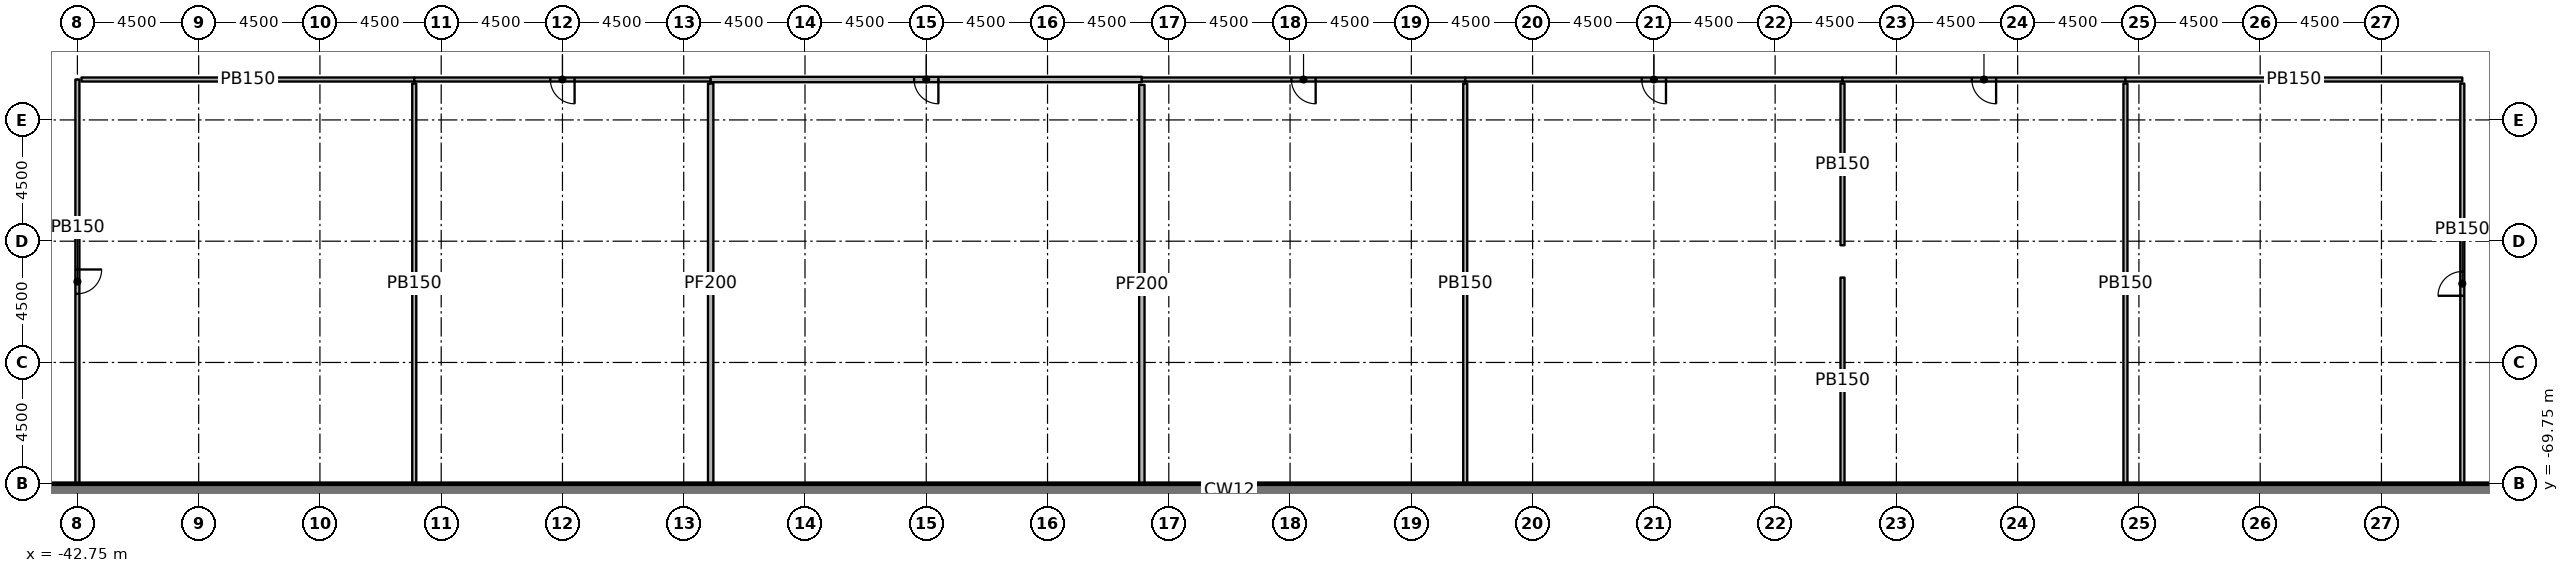
"""IFC4 building model, lengths in metres.
Left out: names, types, materials, properties, quantities, classifications, styles, units other than length and angle.
Written with IfcOpenShell. Run it as: python <this file> out.ifc"""

import sys

from ifc_helpers import new_model, si_unit, direction, frame, frame_2d, origin, origin_2d, place, context, subcontext, project, spatial, rectangle, extrude, element, fill, save


model = new_model("IFC4")
c1 = context("Model", 3, precision=1e-05, world=origin(), true_north=direction((0.0, 1.0)))
c2 = subcontext(c1, "Body", "Model", "MODEL_VIEW")
j1 = project(units=[si_unit("LENGTHUNIT", "METRE"), si_unit("PLANEANGLEUNIT", "RADIAN")], contexts=[c1])
p1 = place(None, origin())
s1 = spatial("IfcSite", under=j1, at=p1, CompositionType="ELEMENT")
p2 = place(p1, origin())
s2 = spatial("IfcBuilding", under=s1, at=p2, CompositionType="ELEMENT")
p3 = place(p2, frame((0.0, 0.0, -8.0)))
s3 = spatial("IfcBuildingStorey", under=s2, at=p3, CompositionType="ELEMENT", Elevation=-8.0)
for number, where, z_axis, x_axis in (
    (1, (-40.5, -61.5, 0.0), (0.0, 0.0, 1.0), (1.0, 0.0, 0.0)),
    (2, (-31.5, -61.5, 0.0), (0.0, 0.0, 1.0), (1.0, 0.0, 0.0)),
    (3, (-22.5, -61.5, 0.0), (0.0, 0.0, 1.0), (1.0, 0.0, 0.0)),
    (4, (-13.5, -61.5, 0.0), (0.0, 0.0, 1.0), (1.0, 0.0, 0.0)),
    (5, (-4.5, -61.5, 0.0), (0.0, 0.0, 1.0), (1.0, 0.0, 0.0)),
    (6, (4.5, -61.5, 0.0), (0.0, 0.0, 1.0), (1.0, 0.0, 0.0)),
    (7, (13.5, -61.5, 0.0), (0.0, 0.0, 1.0), (1.0, 0.0, 0.0)),
    (8, (22.5, -61.5, 0.0), (0.0, 0.0, 1.0), (1.0, 0.0, 0.0)),
    (9, (31.5, -61.5, 0.0), (0.0, 0.0, 1.0), (1.0, 0.0, 0.0)),
    (10, (40.5, -61.5, 0.0), (0.0, 0.0, 1.0), (1.0, 0.0, 0.0)),
):
    element("IfcColumn", number, at=place(p3, frame(where, z_axis=z_axis, x_axis=x_axis)), inside=s3, PredefinedType="COLUMN", context=c2, shape_type="SweptSolid", body=[
        extrude(rectangle(XDim=1.2, YDim=1.2, at=origin_2d()), origin(), (0.0, 0.0, 1.0), 3.4),
    ])
p4 = place(p3, frame((-61.25, -70.0, 0.0), z_axis=(0.0, 0.0, 1.0), x_axis=(1.0, 0.0, 0.0)))
e11 = element("IfcWall", 11, at=p4, inside=s3, PredefinedType="SOLIDWALL", context=c2, shape_type="SweptSolid", body=[
    extrude(rectangle(XDim=122.5, YDim=0.5, at=frame_2d((61.25, 0.0))), origin(), (0.0, 0.0, 1.0), 4.0),
])
p5 = place(p3, frame((-42.75, -54.75, 0.0), z_axis=(0.0, 0.0, 1.0), x_axis=(0.0, -1.0, 0.0)))
e12 = element("IfcWall", 12, at=p5, inside=s3, PredefinedType="PARTITIONING", context=c2, shape_type="SweptSolid", body=[
    extrude(rectangle(XDim=15.0, YDim=0.15, at=frame_2d((7.5, 0.0))), origin(), (0.0, 0.0, 1.0), 3.4),
])
p6 = place(p5, frame((7.05, 0.0, 0.0)))
e13 = element("IfcOpeningElement", 13, at=p6, cuts=e12, PredefinedType="OPENING", context=c2, shape_type="SweptSolid", body=[
    extrude(rectangle(XDim=0.9, YDim=2.1, at=frame_2d((0.45, 1.05))), frame((0.0, 0.085, 0.0), z_axis=(0.0, -1.0, 0.0), x_axis=(1.0, 0.0, 0.0)), (0.0, 0.0, 1.0), 0.17),
])
p7 = place(p3, frame((-30.25, -54.75, 0.0), z_axis=(0.0, 0.0, 1.0), x_axis=(-1.0, 0.0, 0.0)))
e14 = element("IfcWall", 14, at=p7, inside=s3, PredefinedType="PARTITIONING", context=c2, shape_type="SweptSolid", body=[
    extrude(rectangle(XDim=12.35, YDim=0.15, at=frame_2d((6.175, 0.0))), origin(), (0.0, 0.0, 1.0), 3.4),
])
p8 = place(p3, frame((-19.25, -54.75, 0.0), z_axis=(0.0, 0.0, 1.0), x_axis=(-1.0, 0.0, 0.0)))
e15 = element("IfcWall", 15, at=p8, inside=s3, PredefinedType="PARTITIONING", context=c2, shape_type="SweptSolid", body=[
    extrude(rectangle(XDim=11.0, YDim=0.15, at=frame_2d((5.5, 0.0))), origin(), (0.0, 0.0, 1.0), 3.4),
])
p9 = place(p8, frame((5.05, 0.0, 0.0)))
e16 = element("IfcOpeningElement", 16, at=p9, cuts=e15, PredefinedType="OPENING", context=c2, shape_type="SweptSolid", body=[
    extrude(rectangle(XDim=0.9, YDim=2.1, at=frame_2d((0.45, 1.05))), frame((0.0, 0.085, 0.0), z_axis=(0.0, -1.0, 0.0), x_axis=(1.0, 0.0, 0.0)), (0.0, 0.0, 1.0), 0.17),
])
p10 = place(p3, frame((-3.25, -54.75, 0.0), z_axis=(0.0, 0.0, 1.0), x_axis=(-1.0, 0.0, 0.0)))
e17 = element("IfcWall", 17, at=p10, inside=s3, PredefinedType="PARTITIONING", context=c2, shape_type="SweptSolid", body=[
    extrude(rectangle(XDim=16.0, YDim=0.2, at=frame_2d((8.0, 0.0))), origin(), (0.0, 0.0, 1.0), 3.4),
])
p11 = place(p10, frame((7.55, 0.0, 0.0)))
e18 = element("IfcOpeningElement", 18, at=p11, cuts=e17, PredefinedType="OPENING", context=c2, shape_type="SweptSolid", body=[
    extrude(rectangle(XDim=0.9, YDim=2.1, at=frame_2d((0.45, 1.05))), frame((0.0, 0.11, 0.0), z_axis=(0.0, -1.0, 0.0), x_axis=(1.0, 0.0, 0.0)), (0.0, 0.0, 1.0), 0.22),
])
p12 = place(p3, frame((8.75, -54.75, 0.0), z_axis=(0.0, 0.0, 1.0), x_axis=(-1.0, 0.0, 0.0)))
e19 = element("IfcWall", 19, at=p12, inside=s3, PredefinedType="PARTITIONING", context=c2, shape_type="SweptSolid", body=[
    extrude(rectangle(XDim=12.0, YDim=0.15, at=frame_2d((6.0, 0.0))), origin(), (0.0, 0.0, 1.0), 3.4),
])
p13 = place(p12, frame((5.55, 0.0, 0.0)))
e20 = element("IfcOpeningElement", 20, at=p13, cuts=e19, PredefinedType="OPENING", context=c2, shape_type="SweptSolid", body=[
    extrude(rectangle(XDim=0.9, YDim=2.1, at=frame_2d((0.45, 1.05))), frame((0.0, 0.085, 0.0), z_axis=(0.0, -1.0, 0.0), x_axis=(1.0, 0.0, 0.0)), (0.0, 0.0, 1.0), 0.17),
])
p14 = place(p3, frame((22.75, -54.75, 0.0), z_axis=(0.0, 0.0, 1.0), x_axis=(-1.0, 0.0, 0.0)))
e21 = element("IfcWall", 21, at=p14, inside=s3, PredefinedType="PARTITIONING", context=c2, shape_type="SweptSolid", body=[
    extrude(rectangle(XDim=14.0, YDim=0.15, at=frame_2d((7.0, 0.0))), origin(), (0.0, 0.0, 1.0), 3.4),
])
p15 = place(p14, frame((6.55, 0.0, 0.0)))
e22 = element("IfcOpeningElement", 22, at=p15, cuts=e21, PredefinedType="OPENING", context=c2, shape_type="SweptSolid", body=[
    extrude(rectangle(XDim=0.9, YDim=2.1, at=frame_2d((0.45, 1.05))), frame((0.0, 0.085, 0.0), z_axis=(0.0, -1.0, 0.0), x_axis=(1.0, 0.0, 0.0)), (0.0, 0.0, 1.0), 0.17),
])
p16 = place(p3, frame((33.25, -54.75, 0.0), z_axis=(0.0, 0.0, 1.0), x_axis=(-1.0, 0.0, 0.0)))
e23 = element("IfcWall", 23, at=p16, inside=s3, PredefinedType="PARTITIONING", context=c2, shape_type="SweptSolid", body=[
    extrude(rectangle(XDim=10.5, YDim=0.15, at=frame_2d((5.25, 0.0))), origin(), (0.0, 0.0, 1.0), 3.4),
])
p17 = place(p16, frame((4.8, 0.0, 0.0)))
e24 = element("IfcOpeningElement", 24, at=p17, cuts=e23, PredefinedType="OPENING", context=c2, shape_type="SweptSolid", body=[
    extrude(rectangle(XDim=0.9, YDim=2.1, at=frame_2d((0.45, 1.05))), frame((0.0, 0.085, 0.0), z_axis=(0.0, -1.0, 0.0), x_axis=(1.0, 0.0, 0.0)), (0.0, 0.0, 1.0), 0.17),
])
p18 = place(p3, frame((45.75, -54.75, 0.0), z_axis=(0.0, 0.0, 1.0), x_axis=(-1.0, 0.0, 0.0)))
e25 = element("IfcWall", 25, at=p18, inside=s3, PredefinedType="PARTITIONING", context=c2, shape_type="SweptSolid", body=[
    extrude(rectangle(XDim=12.5, YDim=0.15, at=frame_2d((6.25, 0.0))), origin(), (0.0, 0.0, 1.0), 3.4),
])
p19 = place(p3, frame((-30.25, -54.9, 0.0), z_axis=(0.0, 0.0, 1.0), x_axis=(0.0, -1.0, 0.0)))
e26 = element("IfcWall", 26, at=p19, inside=s3, PredefinedType="PARTITIONING", context=c2, shape_type="SweptSolid", body=[
    extrude(rectangle(XDim=14.85, YDim=0.15, at=frame_2d((7.425, 0.0))), origin(), (0.0, 0.0, 1.0), 3.4),
])
p20 = place(p3, frame((-19.25, -54.9, 0.0), z_axis=(0.0, 0.0, 1.0), x_axis=(0.0, -1.0, 0.0)))
e27 = element("IfcWall", 27, at=p20, inside=s3, PredefinedType="PARTITIONING", context=c2, shape_type="SweptSolid", body=[
    extrude(rectangle(XDim=14.85, YDim=0.2, at=frame_2d((7.425, 0.0))), origin(), (0.0, 0.0, 1.0), 3.4),
])
p21 = place(p3, frame((-3.25, -54.95, 0.0), z_axis=(0.0, 0.0, 1.0), x_axis=(0.0, -1.0, 0.0)))
e28 = element("IfcWall", 28, at=p21, inside=s3, PredefinedType="PARTITIONING", context=c2, shape_type="SweptSolid", body=[
    extrude(rectangle(XDim=14.8, YDim=0.2, at=frame_2d((7.4, 0.0))), origin(), (0.0, 0.0, 1.0), 3.4),
])
p22 = place(p3, frame((8.75, -54.9, 0.0), z_axis=(0.0, 0.0, 1.0), x_axis=(0.0, -1.0, 0.0)))
e29 = element("IfcWall", 29, at=p22, inside=s3, PredefinedType="PARTITIONING", context=c2, shape_type="SweptSolid", body=[
    extrude(rectangle(XDim=14.85, YDim=0.15, at=frame_2d((7.425, 0.0))), origin(), (0.0, 0.0, 1.0), 3.4),
])
p23 = place(p3, frame((22.75, -54.9, 0.0), z_axis=(0.0, 0.0, 1.0), x_axis=(0.0, -1.0, 0.0)))
e30 = element("IfcWall", 30, at=p23, inside=s3, PredefinedType="PARTITIONING", context=c2, shape_type="SweptSolid", body=[
    extrude(rectangle(XDim=6.0, YDim=0.15, at=frame_2d((3.0, 0.0))), origin(), (0.0, 0.0, 1.0), 3.4),
])
p24 = place(p3, frame((22.75, -62.1, 0.0), z_axis=(0.0, 0.0, 1.0), x_axis=(0.0, -1.0, 0.0)))
e31 = element("IfcWall", 31, at=p24, inside=s3, PredefinedType="PARTITIONING", context=c2, shape_type="SweptSolid", body=[
    extrude(rectangle(XDim=7.65, YDim=0.15, at=frame_2d((3.825, 0.0))), origin(), (0.0, 0.0, 1.0), 3.4),
])
p25 = place(p3, frame((33.25, -54.9, 0.0), z_axis=(0.0, 0.0, 1.0), x_axis=(0.0, -1.0, 0.0)))
e32 = element("IfcWall", 32, at=p25, inside=s3, PredefinedType="PARTITIONING", context=c2, shape_type="SweptSolid", body=[
    extrude(rectangle(XDim=14.85, YDim=0.15, at=frame_2d((7.425, 0.0))), origin(), (0.0, 0.0, 1.0), 3.4),
])
p26 = place(p3, frame((45.75, -69.75, 0.0), z_axis=(0.0, 0.0, 1.0), x_axis=(0.0, 1.0, 0.0)))
e33 = element("IfcWall", 33, at=p26, inside=s3, PredefinedType="PARTITIONING", context=c2, shape_type="SweptSolid", body=[
    extrude(rectangle(XDim=14.85, YDim=0.15, at=frame_2d((7.425, 0.0))), origin(), (0.0, 0.0, 1.0), 3.4),
])
p27 = place(p26, frame((6.975, 0.0, 0.0)))
e34 = element("IfcOpeningElement", 34, at=p27, cuts=e33, PredefinedType="OPENING", context=c2, shape_type="SweptSolid", body=[
    extrude(rectangle(XDim=0.9, YDim=2.1, at=frame_2d((0.45, 1.05))), frame((0.0, 0.085, 0.0), z_axis=(0.0, -1.0, 0.0), x_axis=(1.0, 0.0, 0.0)), (0.0, 0.0, 1.0), 0.17),
])
p28 = place(p6, origin())
e35 = element("IfcDoor", 35, at=p28, inside=s3, OperationType="SINGLE_SWING_LEFT", PredefinedType="DOOR", context=c2, shape_type="SweptSolid", body=[
    extrude(rectangle(XDim=0.9, YDim=2.1, at=frame_2d((0.45, 1.05))), frame((0.0, 0.025, 0.0), z_axis=(0.0, -1.0, 0.0), x_axis=(1.0, 0.0, 0.0)), (0.0, 0.0, 1.0), 0.05),
])
fill(e13, e35)
p29 = place(p9, origin())
e36 = element("IfcDoor", 36, at=p29, inside=s3, OperationType="SINGLE_SWING_LEFT", PredefinedType="DOOR", context=c2, shape_type="SweptSolid", body=[
    extrude(rectangle(XDim=0.9, YDim=2.1, at=frame_2d((0.45, 1.05))), frame((0.0, 0.025, 0.0), z_axis=(0.0, -1.0, 0.0), x_axis=(1.0, 0.0, 0.0)), (0.0, 0.0, 1.0), 0.05),
])
fill(e16, e36)
p30 = place(p11, origin())
e37 = element("IfcDoor", 37, at=p30, inside=s3, OperationType="SINGLE_SWING_LEFT", PredefinedType="DOOR", context=c2, shape_type="SweptSolid", body=[
    extrude(rectangle(XDim=0.9, YDim=2.1, at=frame_2d((0.45, 1.05))), frame((0.0, 0.025, 0.0), z_axis=(0.0, -1.0, 0.0), x_axis=(1.0, 0.0, 0.0)), (0.0, 0.0, 1.0), 0.05),
])
fill(e18, e37)
p31 = place(p13, origin())
e38 = element("IfcDoor", 38, at=p31, inside=s3, OperationType="SINGLE_SWING_LEFT", PredefinedType="DOOR", context=c2, shape_type="SweptSolid", body=[
    extrude(rectangle(XDim=0.9, YDim=2.1, at=frame_2d((0.45, 1.05))), frame((0.0, 0.025, 0.0), z_axis=(0.0, -1.0, 0.0), x_axis=(1.0, 0.0, 0.0)), (0.0, 0.0, 1.0), 0.05),
])
fill(e20, e38)
p32 = place(p15, origin())
e39 = element("IfcDoor", 39, at=p32, inside=s3, OperationType="SINGLE_SWING_LEFT", PredefinedType="DOOR", context=c2, shape_type="SweptSolid", body=[
    extrude(rectangle(XDim=0.9, YDim=2.1, at=frame_2d((0.45, 1.05))), frame((0.0, 0.025, 0.0), z_axis=(0.0, -1.0, 0.0), x_axis=(1.0, 0.0, 0.0)), (0.0, 0.0, 1.0), 0.05),
])
fill(e22, e39)
p33 = place(p17, origin())
e40 = element("IfcDoor", 40, at=p33, inside=s3, OperationType="SINGLE_SWING_LEFT", PredefinedType="DOOR", context=c2, shape_type="SweptSolid", body=[
    extrude(rectangle(XDim=0.9, YDim=2.1, at=frame_2d((0.45, 1.05))), frame((0.0, 0.025, 0.0), z_axis=(0.0, -1.0, 0.0), x_axis=(1.0, 0.0, 0.0)), (0.0, 0.0, 1.0), 0.05),
])
fill(e24, e40)
p34 = place(p27, origin())
e41 = element("IfcDoor", 41, at=p34, inside=s3, OperationType="SINGLE_SWING_LEFT", PredefinedType="DOOR", context=c2, shape_type="SweptSolid", body=[
    extrude(rectangle(XDim=0.9, YDim=2.1, at=frame_2d((0.45, 1.05))), frame((0.0, 0.025, 0.0), z_axis=(0.0, -1.0, 0.0), x_axis=(1.0, 0.0, 0.0)), (0.0, 0.0, 1.0), 0.05),
])
fill(e34, e41)
save(model, sys.argv[1])
